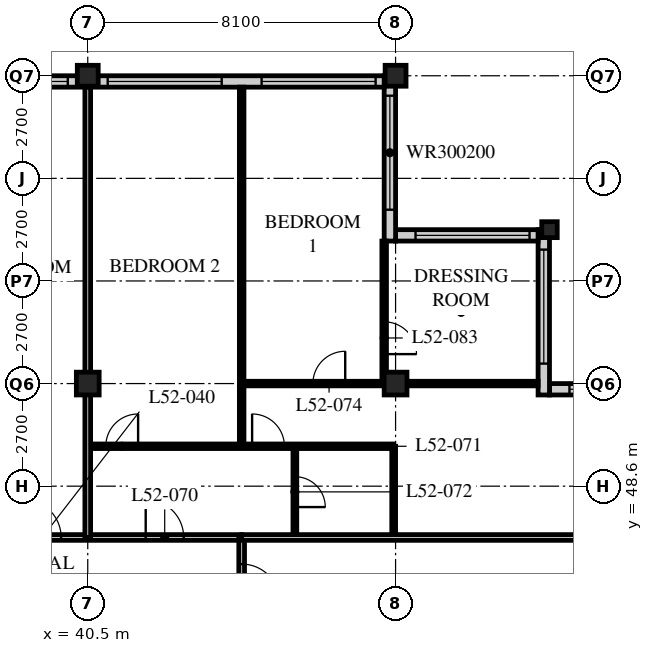
"""IFC4 building model, lengths in metres.
Left out: names, types, materials, properties, quantities, classifications, styles, units other than length and angle.
Written with IfcOpenShell. Run it as: python <this file> out.ifc"""

import sys

from ifc_helpers import new_model, si_unit, direction, frame, frame_2d, origin, origin_2d, place, context, subcontext, project, spatial, rectangle, hollow_rectangle, i_section, extrude, element, fill, save


model = new_model("IFC4")
c1 = context("Model", 3, precision=1e-05, world=origin(), true_north=direction((0.0, 1.0)))
c2 = subcontext(c1, "Body", "Model", "MODEL_VIEW")
j1 = project(units=[si_unit("LENGTHUNIT", "METRE"), si_unit("PLANEANGLEUNIT", "RADIAN")], contexts=[c1])
p1 = place(None, origin())
s1 = spatial("IfcSite", under=j1, at=p1, CompositionType="ELEMENT")
p2 = place(p1, origin())
s2 = spatial("IfcBuilding", under=s1, at=p2, CompositionType="ELEMENT")
p3 = place(p2, frame((0.0, 0.0, 202.8)))
s3 = spatial("IfcBuildingStorey", under=s2, at=p3, CompositionType="ELEMENT", Elevation=202.8)
p4 = place(p3, frame((40.5, 51.3, 0.0), z_axis=(0.0, 0.0, 1.0), x_axis=(1.0, 0.0, 0.0)))
e1 = element("IfcColumn", 1, at=p4, inside=s3, PredefinedType="COLUMN", context=c2, shape_type="SweptSolid", body=[
    extrude(hollow_rectangle(XDim=0.6, YDim=0.6, WallThickness=0.05, at=origin_2d()), origin(), (0.0, 0.0, 1.0), 3.6),
])
p5 = place(p3, frame((40.5, 59.4, 0.0), z_axis=(0.0, 0.0, 1.0), x_axis=(1.0, 0.0, 0.0)))
e2 = element("IfcColumn", 2, at=p5, inside=s3, PredefinedType="COLUMN", context=c2, shape_type="SweptSolid", body=[
    extrude(hollow_rectangle(XDim=0.55, YDim=0.55, WallThickness=0.045, at=origin_2d()), origin(), (0.0, 0.0, 1.0), 3.6),
])
p6 = place(p3, frame((48.6, 51.3, 0.0), z_axis=(0.0, 0.0, 1.0), x_axis=(1.0, 0.0, 0.0)))
e3 = element("IfcColumn", 3, at=p6, inside=s3, PredefinedType="COLUMN", context=c2, shape_type="SweptSolid", body=[
    extrude(hollow_rectangle(XDim=0.6, YDim=0.6, WallThickness=0.05, at=origin_2d()), origin(), (0.0, 0.0, 1.0), 3.6),
])
p7 = place(p3, frame((48.6, 59.4, 0.0), z_axis=(0.0, 0.0, 1.0), x_axis=(1.0, 0.0, 0.0)))
e4 = element("IfcColumn", 4, at=p7, inside=s3, PredefinedType="COLUMN", context=c2, shape_type="SweptSolid", body=[
    extrude(hollow_rectangle(XDim=0.55, YDim=0.55, WallThickness=0.045, at=origin_2d()), origin(), (0.0, 0.0, 1.0), 3.6),
])
p8 = place(p3, frame((52.65, 55.35, 0.0), z_axis=(0.0, 0.0, 1.0), x_axis=(1.0, 0.0, 0.0)))
e5 = element("IfcColumn", 5, at=p8, inside=s3, PredefinedType="COLUMN", context=c2, shape_type="SweptSolid", body=[
    extrude(i_section(OverallWidth=0.407, OverallDepth=0.419, WebThickness=0.031, FlangeThickness=0.049, FilletRadius=0.015, at=origin_2d()), origin(), (0.0, 0.0, 1.0), 3.6),
])
p9 = place(p3, frame((56.4, 51.15, 0.0), z_axis=(0.0, 0.0, 1.0), x_axis=(-1.0, 0.0, 0.0)))
e6 = element("IfcWall", 6, at=p9, inside=s3, PredefinedType="SOLIDWALL", context=c2, shape_type="SweptSolid", body=[
    extrude(rectangle(XDim=3.75, YDim=0.3, at=frame_2d((1.875, 0.0))), origin(), (0.0, 0.0, 1.0), 3.39),
])
p10 = place(p9, frame((0.225, 0.0, 0.6)))
e7 = element("IfcOpeningElement", 7, at=p10, cuts=e6, PredefinedType="OPENING", context=c2, shape_type="SweptSolid", body=[
    extrude(rectangle(XDim=3.0, YDim=2.0, at=frame_2d((1.5, 1.0))), frame((0.0, 0.16, 0.0), z_axis=(0.0, -1.0, 0.0), x_axis=(1.0, 0.0, 0.0)), (0.0, 0.0, 1.0), 0.32),
])
p11 = place(p3, frame((52.5, 51.0, 0.0), z_axis=(0.0, 0.0, 1.0), x_axis=(0.0, 1.0, 0.0)))
e8 = element("IfcWall", 8, at=p11, inside=s3, PredefinedType="SOLIDWALL", context=c2, shape_type="SweptSolid", body=[
    extrude(rectangle(XDim=4.35, YDim=0.3, at=frame_2d((2.175, 0.0))), origin(), (0.0, 0.0, 1.0), 3.39),
])
p12 = place(p11, frame((0.825, 0.0, 0.6)))
e9 = element("IfcOpeningElement", 9, at=p12, cuts=e8, PredefinedType="OPENING", context=c2, shape_type="SweptSolid", body=[
    extrude(rectangle(XDim=3.0, YDim=2.0, at=frame_2d((1.5, 1.0))), frame((0.0, 0.16, 0.0), z_axis=(0.0, -1.0, 0.0), x_axis=(1.0, 0.0, 0.0)), (0.0, 0.0, 1.0), 0.32),
])
p13 = place(p3, frame((52.35, 55.2, 0.0), z_axis=(0.0, 0.0, 1.0), x_axis=(-1.0, 0.0, 0.0)))
e10 = element("IfcWall", 10, at=p13, inside=s3, PredefinedType="SOLIDWALL", context=c2, shape_type="SweptSolid", body=[
    extrude(rectangle(XDim=3.75, YDim=0.3, at=frame_2d((1.875, 0.0))), origin(), (0.0, 0.0, 1.0), 3.39),
])
p14 = place(p13, frame((0.225, 0.0, 0.6)))
e11 = element("IfcOpeningElement", 11, at=p14, cuts=e10, PredefinedType="OPENING", context=c2, shape_type="SweptSolid", body=[
    extrude(rectangle(XDim=3.0, YDim=2.0, at=frame_2d((1.5, 1.0))), frame((0.0, 0.16, 0.0), z_axis=(0.0, -1.0, 0.0), x_axis=(1.0, 0.0, 0.0)), (0.0, 0.0, 1.0), 0.32),
])
p15 = place(p3, frame((48.45, 55.05, 0.0), z_axis=(0.0, 0.0, 1.0), x_axis=(0.0, 1.0, 0.0)))
e12 = element("IfcWall", 12, at=p15, inside=s3, PredefinedType="SOLIDWALL", context=c2, shape_type="SweptSolid", body=[
    extrude(rectangle(XDim=4.35, YDim=0.3, at=frame_2d((2.175, 0.0))), origin(), (0.0, 0.0, 1.0), 3.39),
])
p16 = place(p15, frame((0.825, 0.0, 0.6)))
e13 = element("IfcOpeningElement", 13, at=p16, cuts=e12, PredefinedType="OPENING", context=c2, shape_type="SweptSolid", body=[
    extrude(rectangle(XDim=3.0, YDim=2.0, at=frame_2d((1.5, 1.0))), frame((0.0, 0.16, 0.0), z_axis=(0.0, -1.0, 0.0), x_axis=(1.0, 0.0, 0.0)), (0.0, 0.0, 1.0), 0.32),
])
p17 = place(p3, frame((48.3, 59.25, 0.0), z_axis=(0.0, 0.0, 1.0), x_axis=(-1.0, 0.0, 0.0)))
e14 = element("IfcWall", 14, at=p17, inside=s3, PredefinedType="SOLIDWALL", context=c2, shape_type="SweptSolid", body=[
    extrude(rectangle(XDim=40.2, YDim=0.3, at=frame_2d((20.1, 0.0))), origin(), (0.0, 0.0, 1.0), 3.39),
])
p18 = place(p17, frame((0.225, 0.0, 0.6)))
e15 = element("IfcOpeningElement", 15, at=p18, cuts=e14, PredefinedType="OPENING", context=c2, shape_type="SweptSolid", body=[
    extrude(rectangle(XDim=3.0, YDim=2.4, at=frame_2d((1.5, 1.2))), frame((0.0, 0.16, 0.0), z_axis=(0.0, -1.0, 0.0), x_axis=(1.0, 0.0, 0.0)), (0.0, 0.0, 1.0), 0.32),
])
p19 = place(p17, frame((4.275, 0.0, 0.6)))
e16 = element("IfcOpeningElement", 16, at=p19, cuts=e14, PredefinedType="OPENING", context=c2, shape_type="SweptSolid", body=[
    extrude(rectangle(XDim=3.0, YDim=2.4, at=frame_2d((1.5, 1.2))), frame((0.0, 0.16, 0.0), z_axis=(0.0, -1.0, 0.0), x_axis=(1.0, 0.0, 0.0)), (0.0, 0.0, 1.0), 0.32),
])
p20 = place(p17, frame((8.325, 0.0, 0.6)))
e17 = element("IfcOpeningElement", 17, at=p20, cuts=e14, PredefinedType="OPENING", context=c2, shape_type="SweptSolid", body=[
    extrude(rectangle(XDim=3.0, YDim=2.4, at=frame_2d((1.5, 1.2))), frame((0.0, 0.16, 0.0), z_axis=(0.0, -1.0, 0.0), x_axis=(1.0, 0.0, 0.0)), (0.0, 0.0, 1.0), 0.32),
])
p21 = place(p17, frame((12.375, 0.0, 0.6)))
e18 = element("IfcOpeningElement", 18, at=p21, cuts=e14, PredefinedType="OPENING", context=c2, shape_type="SweptSolid", body=[
    extrude(rectangle(XDim=3.0, YDim=2.4, at=frame_2d((1.5, 1.2))), frame((0.0, 0.16, 0.0), z_axis=(0.0, -1.0, 0.0), x_axis=(1.0, 0.0, 0.0)), (0.0, 0.0, 1.0), 0.32),
])
p22 = place(p17, frame((16.425, 0.0, 0.6)))
e19 = element("IfcOpeningElement", 19, at=p22, cuts=e14, PredefinedType="OPENING", context=c2, shape_type="SweptSolid", body=[
    extrude(rectangle(XDim=3.0, YDim=2.4, at=frame_2d((1.5, 1.2))), frame((0.0, 0.16, 0.0), z_axis=(0.0, -1.0, 0.0), x_axis=(1.0, 0.0, 0.0)), (0.0, 0.0, 1.0), 0.32),
])
p23 = place(p17, frame((20.475, 0.0, 0.6)))
e20 = element("IfcOpeningElement", 20, at=p23, cuts=e14, PredefinedType="OPENING", context=c2, shape_type="SweptSolid", body=[
    extrude(rectangle(XDim=3.0, YDim=2.4, at=frame_2d((1.5, 1.2))), frame((0.0, 0.16, 0.0), z_axis=(0.0, -1.0, 0.0), x_axis=(1.0, 0.0, 0.0)), (0.0, 0.0, 1.0), 0.32),
])
p24 = place(p17, frame((24.525, 0.0, 0.6)))
e21 = element("IfcOpeningElement", 21, at=p24, cuts=e14, PredefinedType="OPENING", context=c2, shape_type="SweptSolid", body=[
    extrude(rectangle(XDim=3.0, YDim=2.4, at=frame_2d((1.5, 1.2))), frame((0.0, 0.16, 0.0), z_axis=(0.0, -1.0, 0.0), x_axis=(1.0, 0.0, 0.0)), (0.0, 0.0, 1.0), 0.32),
])
p25 = place(p17, frame((28.575, 0.0, 0.6)))
e22 = element("IfcOpeningElement", 22, at=p25, cuts=e14, PredefinedType="OPENING", context=c2, shape_type="SweptSolid", body=[
    extrude(rectangle(XDim=3.0, YDim=2.4, at=frame_2d((1.5, 1.2))), frame((0.0, 0.16, 0.0), z_axis=(0.0, -1.0, 0.0), x_axis=(1.0, 0.0, 0.0)), (0.0, 0.0, 1.0), 0.32),
])
p26 = place(p17, frame((32.625, 0.0, 0.6)))
e23 = element("IfcOpeningElement", 23, at=p26, cuts=e14, PredefinedType="OPENING", context=c2, shape_type="SweptSolid", body=[
    extrude(rectangle(XDim=3.0, YDim=2.4, at=frame_2d((1.5, 1.2))), frame((0.0, 0.16, 0.0), z_axis=(0.0, -1.0, 0.0), x_axis=(1.0, 0.0, 0.0)), (0.0, 0.0, 1.0), 0.32),
])
p27 = place(p17, frame((36.675, 0.0, 0.6)))
e24 = element("IfcOpeningElement", 24, at=p27, cuts=e14, PredefinedType="OPENING", context=c2, shape_type="SweptSolid", body=[
    extrude(rectangle(XDim=3.0, YDim=2.4, at=frame_2d((1.5, 1.2))), frame((0.0, 0.16, 0.0), z_axis=(0.0, -1.0, 0.0), x_axis=(1.0, 0.0, 0.0)), (0.0, 0.0, 1.0), 0.32),
])
p28 = place(p3, frame((8.1, 47.25, 0.0), z_axis=(0.0, 0.0, 1.0), x_axis=(1.0, 0.0, 0.0)))
e25 = element("IfcWall", 25, at=p28, inside=s3, PredefinedType="PARTITIONING", context=c2, shape_type="SweptSolid", body=[
    extrude(rectangle(XDim=36.45, YDim=0.15, at=frame_2d((18.225, 0.0))), origin(), (0.0, 0.0, 1.0), 3.39),
])
p29 = place(p28, frame((4.45, 0.0, 0.0)))
e26 = element("IfcOpeningElement", 26, at=p29, cuts=e25, PredefinedType="OPENING", context=c2, shape_type="SweptSolid", body=[
    extrude(rectangle(XDim=1.0, YDim=2.1, at=frame_2d((0.5, 1.05))), frame((0.0, 0.085, 0.0), z_axis=(0.0, -1.0, 0.0), x_axis=(1.0, 0.0, 0.0)), (0.0, 0.0, 1.0), 0.17),
])
p30 = place(p28, frame((12.55, 0.0, 0.0)))
e27 = element("IfcOpeningElement", 27, at=p30, cuts=e25, PredefinedType="OPENING", context=c2, shape_type="SweptSolid", body=[
    extrude(rectangle(XDim=1.0, YDim=2.1, at=frame_2d((0.5, 1.05))), frame((0.0, 0.085, 0.0), z_axis=(0.0, -1.0, 0.0), x_axis=(1.0, 0.0, 0.0)), (0.0, 0.0, 1.0), 0.17),
])
p31 = place(p28, frame((30.7, 0.0, 0.0)))
e28 = element("IfcOpeningElement", 28, at=p31, cuts=e25, PredefinedType="OPENING", context=c2, shape_type="SweptSolid", body=[
    extrude(rectangle(XDim=1.0, YDim=2.1, at=frame_2d((0.5, 1.05))), frame((0.0, 0.085, 0.0), z_axis=(0.0, -1.0, 0.0), x_axis=(1.0, 0.0, 0.0)), (0.0, 0.0, 1.0), 0.17),
])
p32 = place(p28, frame((33.925, 0.0, 0.0)))
e29 = element("IfcOpeningElement", 29, at=p32, cuts=e25, PredefinedType="OPENING", context=c2, shape_type="SweptSolid", body=[
    extrude(rectangle(XDim=1.0, YDim=2.1, at=frame_2d((0.5, 1.05))), frame((0.0, 0.085, 0.0), z_axis=(0.0, -1.0, 0.0), x_axis=(1.0, 0.0, 0.0)), (0.0, 0.0, 1.0), 0.17),
])
p33 = place(p28, frame((1.525, 0.0, 0.0)))
e30 = element("IfcOpeningElement", 30, at=p33, cuts=e25, PredefinedType="OPENING", context=c2, shape_type="SweptSolid", body=[
    extrude(rectangle(XDim=1.0, YDim=2.1, at=frame_2d((0.5, 1.05))), frame((0.0, 0.085, 0.0), z_axis=(0.0, -1.0, 0.0), x_axis=(1.0, 0.0, 0.0)), (0.0, 0.0, 1.0), 0.17),
])
p34 = place(p3, frame((44.55, 18.9, 0.0), z_axis=(0.0, 0.0, 1.0), x_axis=(0.0, 1.0, 0.0)))
e31 = element("IfcWall", 31, at=p34, inside=s3, PredefinedType="PARTITIONING", context=c2, shape_type="SweptSolid", body=[
    extrude(rectangle(XDim=28.35, YDim=0.15, at=frame_2d((14.175, 0.0))), origin(), (0.0, 0.0, 1.0), 3.39),
])
p35 = place(p34, frame((0.4, 0.0, 0.0)))
e32 = element("IfcOpeningElement", 32, at=p35, cuts=e31, PredefinedType="OPENING", context=c2, shape_type="SweptSolid", body=[
    extrude(rectangle(XDim=1.0, YDim=2.1, at=frame_2d((0.5, 1.05))), frame((0.0, 0.085, 0.0), z_axis=(0.0, -1.0, 0.0), x_axis=(1.0, 0.0, 0.0)), (0.0, 0.0, 1.0), 0.17),
])
p36 = place(p34, frame((12.55, 0.0, 0.0)))
e33 = element("IfcOpeningElement", 33, at=p36, cuts=e31, PredefinedType="OPENING", context=c2, shape_type="SweptSolid", body=[
    extrude(rectangle(XDim=1.0, YDim=2.1, at=frame_2d((0.5, 1.05))), frame((0.0, 0.085, 0.0), z_axis=(0.0, -1.0, 0.0), x_axis=(1.0, 0.0, 0.0)), (0.0, 0.0, 1.0), 0.17),
])
p37 = place(p34, frame((26.65, 0.0, 0.0)))
e34 = element("IfcOpeningElement", 34, at=p37, cuts=e31, PredefinedType="OPENING", context=c2, shape_type="SweptSolid", body=[
    extrude(rectangle(XDim=1.0, YDim=2.1, at=frame_2d((0.5, 1.05))), frame((0.0, 0.085, 0.0), z_axis=(0.0, -1.0, 0.0), x_axis=(1.0, 0.0, 0.0)), (0.0, 0.0, 1.0), 0.17),
])
p38 = place(p3, frame((40.5, 49.65, 0.0), z_axis=(0.0, 0.0, 1.0), x_axis=(1.0, 0.0, 0.0)))
e35 = element("IfcWall", 35, at=p38, inside=s3, PredefinedType="PARTITIONING", context=c2, shape_type="SweptSolid", body=[
    extrude(rectangle(XDim=8.05, YDim=0.12, at=frame_2d((4.025, 0.0))), origin(), (0.0, 0.0, 1.0), 3.39),
])
p39 = place(p38, frame((0.475, 0.0, 0.0)))
e36 = element("IfcOpeningElement", 36, at=p39, cuts=e35, PredefinedType="OPENING", context=c2, shape_type="SweptSolid", body=[
    extrude(rectangle(XDim=0.85, YDim=2.1, at=frame_2d((0.425, 1.05))), frame((0.0, 0.07, 0.0), z_axis=(0.0, -1.0, 0.0), x_axis=(1.0, 0.0, 0.0)), (0.0, 0.0, 1.0), 0.14),
])
p40 = place(p38, frame((4.325, 0.0, 0.0)))
e37 = element("IfcOpeningElement", 37, at=p40, cuts=e35, PredefinedType="OPENING", context=c2, shape_type="SweptSolid", body=[
    extrude(rectangle(XDim=0.85, YDim=2.1, at=frame_2d((0.425, 1.05))), frame((0.0, 0.07, 0.0), z_axis=(0.0, -1.0, 0.0), x_axis=(1.0, 0.0, 0.0)), (0.0, 0.0, 1.0), 0.14),
])
p41 = place(p3, frame((45.95, 47.25, 0.0), z_axis=(0.0, 0.0, 1.0), x_axis=(0.0, 1.0, 0.0)))
e38 = element("IfcWall", 38, at=p41, inside=s3, PredefinedType="PARTITIONING", context=c2, shape_type="SweptSolid", body=[
    extrude(rectangle(XDim=2.4, YDim=0.1, at=frame_2d((1.2, 0.0))), origin(), (0.0, 0.0, 1.0), 3.39),
])
p42 = place(p41, frame((0.8, 0.0, 0.0)))
e39 = element("IfcOpeningElement", 39, at=p42, cuts=e38, PredefinedType="OPENING", context=c2, shape_type="SweptSolid", body=[
    extrude(rectangle(XDim=0.8, YDim=2.1, at=frame_2d((0.4, 1.05))), frame((0.0, 0.06, 0.0), z_axis=(0.0, -1.0, 0.0), x_axis=(1.0, 0.0, 0.0)), (0.0, 0.0, 1.0), 0.12),
])
p43 = place(p3, frame((48.55, 47.25, 0.0), z_axis=(0.0, 0.0, 1.0), x_axis=(0.0, 1.0, 0.0)))
e40 = element("IfcWall", 40, at=p43, inside=s3, PredefinedType="PARTITIONING", context=c2, shape_type="SweptSolid", body=[
    extrude(rectangle(XDim=2.4, YDim=0.1, at=frame_2d((1.2, 0.0))), origin(), (0.0, 0.0, 1.0), 2.778),
])
p44 = place(p3, frame((44.55, 49.65, 0.0), z_axis=(0.0, 0.0, 1.0), x_axis=(0.0, 1.0, 0.0)))
e41 = element("IfcWall", 41, at=p44, inside=s3, PredefinedType="PARTITIONING", context=c2, shape_type="SweptSolid", body=[
    extrude(rectangle(XDim=9.45, YDim=0.12, at=frame_2d((4.725, 0.0))), origin(), (0.0, 0.0, 1.0), 3.39),
])
p45 = place(p3, frame((44.55, 51.3, 0.0), z_axis=(0.0, 0.0, 1.0), x_axis=(1.0, 0.0, 0.0)))
e42 = element("IfcWall", 42, at=p45, inside=s3, PredefinedType="PARTITIONING", context=c2, shape_type="SweptSolid", body=[
    extrude(rectangle(XDim=7.8, YDim=0.12, at=frame_2d((3.9, 0.0))), origin(), (0.0, 0.0, 1.0), 2.778),
])
p46 = place(p45, frame((1.875, 0.0, 0.0)))
e43 = element("IfcOpeningElement", 43, at=p46, cuts=e42, PredefinedType="OPENING", context=c2, shape_type="SweptSolid", body=[
    extrude(rectangle(XDim=0.85, YDim=2.1, at=frame_2d((0.425, 1.05))), frame((0.0, 0.07, 0.0), z_axis=(0.0, -1.0, 0.0), x_axis=(1.0, 0.0, 0.0)), (0.0, 0.0, 1.0), 0.14),
])
p47 = place(p3, frame((44.55, 47.25, 0.0), z_axis=(0.0, 0.0, 1.0), x_axis=(1.0, 0.0, 0.0)))
e44 = element("IfcWall", 44, at=p47, inside=s3, PredefinedType="PARTITIONING", context=c2, shape_type="SweptSolid", body=[
    extrude(rectangle(XDim=11.85, YDim=0.15, at=frame_2d((5.925, 0.0))), origin(), (0.0, 0.0, 1.0), 3.39),
])
p48 = place(p3, frame((40.5, 47.25, 0.0), z_axis=(0.0, 0.0, 1.0), x_axis=(0.0, 1.0, 0.0)))
e45 = element("IfcWall", 45, at=p48, inside=s3, PredefinedType="PARTITIONING", context=c2, shape_type="SweptSolid", body=[
    extrude(rectangle(XDim=11.85, YDim=0.15, at=frame_2d((5.925, 0.0))), origin(), (0.0, 0.0, 1.0), 2.778),
])
p49 = place(p3, frame((48.3, 51.3, 0.0), z_axis=(0.0, 0.0, 1.0), x_axis=(0.0, 1.0, 0.0)))
e46 = element("IfcWall", 46, at=p49, inside=s3, PredefinedType="PARTITIONING", context=c2, shape_type="SweptSolid", body=[
    extrude(rectangle(XDim=3.75, YDim=0.12, at=frame_2d((1.875, 0.0))), origin(), (0.0, 0.0, 1.0), 3.39),
])
p50 = place(p49, frame((0.775, 0.0, 0.0)))
e47 = element("IfcOpeningElement", 47, at=p50, cuts=e46, PredefinedType="OPENING", context=c2, shape_type="SweptSolid", body=[
    extrude(rectangle(XDim=0.85, YDim=2.1, at=frame_2d((0.425, 1.05))), frame((0.0, 0.07, 0.0), z_axis=(0.0, -1.0, 0.0), x_axis=(1.0, 0.0, 0.0)), (0.0, 0.0, 1.0), 0.14),
])
p51 = place(p10, origin())
e48 = element("IfcWindow", 48, at=p51, inside=s3, PartitioningType="SINGLE_PANEL", PredefinedType="WINDOW", context=c2, shape_type="SweptSolid", body=[
    extrude(rectangle(XDim=3.0, YDim=2.0, at=frame_2d((1.5, 1.0))), frame((0.0, 0.03, 0.0), z_axis=(0.0, -1.0, 0.0), x_axis=(1.0, 0.0, 0.0)), (0.0, 0.0, 1.0), 0.06),
])
fill(e7, e48)
p52 = place(p12, origin())
e49 = element("IfcWindow", 49, at=p52, inside=s3, PartitioningType="SINGLE_PANEL", PredefinedType="WINDOW", context=c2, shape_type="SweptSolid", body=[
    extrude(rectangle(XDim=3.0, YDim=2.0, at=frame_2d((1.5, 1.0))), frame((0.0, 0.03, 0.0), z_axis=(0.0, -1.0, 0.0), x_axis=(1.0, 0.0, 0.0)), (0.0, 0.0, 1.0), 0.06),
])
fill(e9, e49)
p53 = place(p14, origin())
e50 = element("IfcWindow", 50, at=p53, inside=s3, PartitioningType="SINGLE_PANEL", PredefinedType="WINDOW", context=c2, shape_type="SweptSolid", body=[
    extrude(rectangle(XDim=3.0, YDim=2.0, at=frame_2d((1.5, 1.0))), frame((0.0, 0.03, 0.0), z_axis=(0.0, -1.0, 0.0), x_axis=(1.0, 0.0, 0.0)), (0.0, 0.0, 1.0), 0.06),
])
fill(e11, e50)
p54 = place(p16, origin())
e51 = element("IfcWindow", 51, at=p54, inside=s3, PartitioningType="SINGLE_PANEL", PredefinedType="WINDOW", context=c2, shape_type="SweptSolid", body=[
    extrude(rectangle(XDim=3.0, YDim=2.0, at=frame_2d((1.5, 1.0))), frame((0.0, 0.03, 0.0), z_axis=(0.0, -1.0, 0.0), x_axis=(1.0, 0.0, 0.0)), (0.0, 0.0, 1.0), 0.06),
])
fill(e13, e51)
p55 = place(p18, origin())
e52 = element("IfcWindow", 52, at=p55, inside=s3, PartitioningType="SINGLE_PANEL", PredefinedType="WINDOW", context=c2, shape_type="SweptSolid", body=[
    extrude(rectangle(XDim=3.0, YDim=2.4, at=frame_2d((1.5, 1.2))), frame((0.0, 0.03, 0.0), z_axis=(0.0, -1.0, 0.0), x_axis=(1.0, 0.0, 0.0)), (0.0, 0.0, 1.0), 0.06),
])
fill(e15, e52)
p56 = place(p19, origin())
e53 = element("IfcWindow", 53, at=p56, inside=s3, PartitioningType="SINGLE_PANEL", PredefinedType="WINDOW", context=c2, shape_type="SweptSolid", body=[
    extrude(rectangle(XDim=3.0, YDim=2.4, at=frame_2d((1.5, 1.2))), frame((0.0, 0.03, 0.0), z_axis=(0.0, -1.0, 0.0), x_axis=(1.0, 0.0, 0.0)), (0.0, 0.0, 1.0), 0.06),
])
fill(e16, e53)
p57 = place(p20, origin())
e54 = element("IfcWindow", 54, at=p57, inside=s3, PartitioningType="SINGLE_PANEL", PredefinedType="WINDOW", context=c2, shape_type="SweptSolid", body=[
    extrude(rectangle(XDim=3.0, YDim=2.4, at=frame_2d((1.5, 1.2))), frame((0.0, 0.03, 0.0), z_axis=(0.0, -1.0, 0.0), x_axis=(1.0, 0.0, 0.0)), (0.0, 0.0, 1.0), 0.06),
])
fill(e17, e54)
p58 = place(p31, origin())
e55 = element("IfcDoor", 55, at=p58, inside=s3, OperationType="SINGLE_SWING_LEFT", PredefinedType="DOOR", context=c2, shape_type="SweptSolid", body=[
    extrude(rectangle(XDim=1.0, YDim=2.1, at=frame_2d((0.5, 1.05))), frame((0.0, 0.025, 0.0), z_axis=(0.0, -1.0, 0.0), x_axis=(1.0, 0.0, 0.0)), (0.0, 0.0, 1.0), 0.05),
])
fill(e28, e55)
p59 = place(p37, origin())
e56 = element("IfcDoor", 56, at=p59, inside=s3, OperationType="SINGLE_SWING_RIGHT", PredefinedType="DOOR", context=c2, shape_type="SweptSolid", body=[
    extrude(rectangle(XDim=1.0, YDim=2.1, at=frame_2d((0.5, 1.05))), frame((0.0, 0.025, 0.0), z_axis=(0.0, -1.0, 0.0), x_axis=(1.0, 0.0, 0.0)), (0.0, 0.0, 1.0), 0.05),
])
fill(e34, e56)
p60 = place(p32, origin())
e57 = element("IfcDoor", 57, at=p60, inside=s3, OperationType="SINGLE_SWING_LEFT", PredefinedType="DOOR", context=c2, shape_type="SweptSolid", body=[
    extrude(rectangle(XDim=1.0, YDim=2.1, at=frame_2d((0.5, 1.05))), frame((0.0, 0.025, 0.0), z_axis=(0.0, -1.0, 0.0), x_axis=(1.0, 0.0, 0.0)), (0.0, 0.0, 1.0), 0.05),
])
fill(e29, e57)
p61 = place(p39, origin())
e58 = element("IfcDoor", 58, at=p61, inside=s3, OperationType="SINGLE_SWING_RIGHT", PredefinedType="DOOR", context=c2, shape_type="SweptSolid", body=[
    extrude(rectangle(XDim=0.85, YDim=2.1, at=frame_2d((0.425, 1.05))), frame((0.0, 0.025, 0.0), z_axis=(0.0, -1.0, 0.0), x_axis=(1.0, 0.0, 0.0)), (0.0, 0.0, 1.0), 0.05),
])
fill(e36, e58)
p62 = place(p42, origin())
e59 = element("IfcDoor", 59, at=p62, inside=s3, OperationType="SINGLE_SWING_RIGHT", PredefinedType="DOOR", context=c2, shape_type="SweptSolid", body=[
    extrude(rectangle(XDim=0.8, YDim=2.1, at=frame_2d((0.4, 1.05))), frame((0.0, 0.025, 0.0), z_axis=(0.0, -1.0, 0.0), x_axis=(1.0, 0.0, 0.0)), (0.0, 0.0, 1.0), 0.05),
])
fill(e39, e59)
p63 = place(p40, origin())
e60 = element("IfcDoor", 60, at=p63, inside=s3, OperationType="SINGLE_SWING_LEFT", PredefinedType="DOOR", context=c2, shape_type="SweptSolid", body=[
    extrude(rectangle(XDim=0.85, YDim=2.1, at=frame_2d((0.425, 1.05))), frame((0.0, 0.025, 0.0), z_axis=(0.0, -1.0, 0.0), x_axis=(1.0, 0.0, 0.0)), (0.0, 0.0, 1.0), 0.05),
])
fill(e37, e60)
p64 = place(p46, origin())
e61 = element("IfcDoor", 61, at=p64, inside=s3, OperationType="SINGLE_SWING_RIGHT", PredefinedType="DOOR", context=c2, shape_type="SweptSolid", body=[
    extrude(rectangle(XDim=0.85, YDim=2.1, at=frame_2d((0.425, 1.05))), frame((0.0, 0.025, 0.0), z_axis=(0.0, -1.0, 0.0), x_axis=(1.0, 0.0, 0.0)), (0.0, 0.0, 1.0), 0.05),
])
fill(e43, e61)
p65 = place(p50, origin())
e62 = element("IfcDoor", 62, at=p65, inside=s3, OperationType="SINGLE_SWING_RIGHT", PredefinedType="DOOR", context=c2, shape_type="SweptSolid", body=[
    extrude(rectangle(XDim=0.85, YDim=2.1, at=frame_2d((0.425, 1.05))), frame((0.0, 0.025, 0.0), z_axis=(0.0, -1.0, 0.0), x_axis=(1.0, 0.0, 0.0)), (0.0, 0.0, 1.0), 0.05),
])
fill(e47, e62)
save(model, sys.argv[1])
